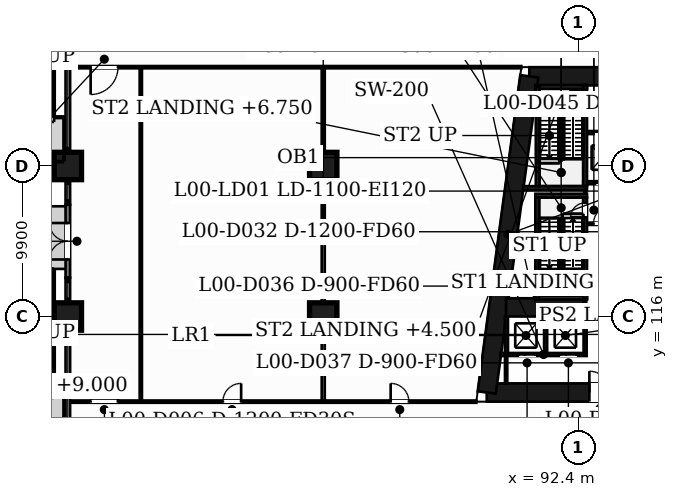
"""IFC4 building model, lengths in metres.
Left out: names, types, materials, properties, quantities, classifications, styles, units other than length and angle.
Written with IfcOpenShell. Run it as: python <this file> out.ifc"""

import sys

from ifc_helpers import new_model, si_unit, direction, frame, frame_2d, origin, origin_2d, place, context, subcontext, project, spatial, rectangle, extrude, element, fill, save


model = new_model("IFC4")
c1 = context("Model", 3, precision=1e-05, world=origin(), true_north=direction((0.0, 1.0)))
c2 = subcontext(c1, "Body", "Model", "MODEL_VIEW")
j1 = project(units=[si_unit("LENGTHUNIT", "METRE"), si_unit("PLANEANGLEUNIT", "RADIAN")], contexts=[c1])
p1 = place(None, origin())
s1 = spatial("IfcSite", under=j1, at=p1, CompositionType="ELEMENT")
p2 = place(p1, origin())
s2 = spatial("IfcBuilding", under=s1, at=p2, CompositionType="ELEMENT")
p3 = place(p2, origin())
s3 = spatial("IfcBuildingStorey", under=s2, at=p3, CompositionType="ELEMENT", Elevation=0.0)
p4 = place(p3, frame((89.156, 131.8, -0.35), z_axis=(0.0, 0.0, 1.0), x_axis=(1.0, 0.0, 0.0)))
e1 = element("IfcWall", 1, at=p4, inside=s3, PredefinedType="SHEAR", context=c2, shape_type="SweptSolid", body=[
    extrude(rectangle(XDim=11.044, YDim=1.2, at=frame_2d((5.522, 0.0))), origin(), (0.0, 0.0, 1.0), 9.35),
])
p5 = place(p4, frame((6.458, 0.0, 0.35)))
e2 = element("IfcOpeningElement", 2, at=p5, cuts=e1, PredefinedType="OPENING", context=c2, shape_type="SweptSolid", body=[
    extrude(rectangle(XDim=1.2, YDim=2.1, at=frame_2d((0.6, 1.05))), frame((0.0, 0.61, 0.0), z_axis=(0.0, -1.0, 0.0), x_axis=(1.0, 0.0, 0.0)), (0.0, 0.0, 1.0), 1.22),
])
p6 = place(p3, frame((100.2, 111.0, -0.35), z_axis=(0.0, 0.0, 1.0), x_axis=(-1.0, 0.0, 0.0)))
e3 = element("IfcWall", 3, at=p6, inside=s3, PredefinedType="SHEAR", context=c2, shape_type="SweptSolid", body=[
    extrude(rectangle(XDim=13.844, YDim=1.2, at=frame_2d((6.922, 0.0))), origin(), (0.0, 0.0, 1.0), 9.35),
])
p7 = place(p6, frame((5.694, 0.0, 0.35)))
e4 = element("IfcOpeningElement", 4, at=p7, cuts=e3, PredefinedType="OPENING", context=c2, shape_type="SweptSolid", body=[
    extrude(rectangle(XDim=1.4, YDim=2.1, at=frame_2d((0.7, 1.05))), frame((0.0, 0.61, 0.0), z_axis=(0.0, -1.0, 0.0), x_axis=(1.0, 0.0, 0.0)), (0.0, 0.0, 1.0), 1.22),
])
p8 = place(p3, frame((86.355, 111.0, -0.35), z_axis=(0.0, 0.0, 1.0), x_axis=(0.133413989637, 0.99106039542, 0.0)))
e5 = element("IfcWall", 5, at=p8, inside=s3, PredefinedType="SHEAR", context=c2, shape_type="SweptSolid", body=[
    extrude(rectangle(XDim=20.988, YDim=1.2, at=frame_2d((10.494, 0.0))), origin(), (0.0, 0.0, 1.0), 9.35),
])
p9 = place(p3, frame((87.623, 116.6, -0.35), z_axis=(0.0, 0.0, 1.0), x_axis=(1.0, 0.0, 0.0)))
e6 = element("IfcWall", 6, at=p9, inside=s3, PredefinedType="SHEAR", context=c2, shape_type="SweptSolid", body=[
    extrude(rectangle(XDim=5.077, YDim=1.2, at=frame_2d((2.539, 0.0))), origin(), (0.0, 0.0, 1.0), 9.35),
])
for number, where, z_axis, x_axis in (
    (7, (58.8, 116.0, -0.35), (0.0, 0.0, 1.0), (1.0, 0.0, 0.0)),
    (8, (75.6, 116.0, -0.35), (0.0, 0.0, 1.0), (1.0, 0.0, 0.0)),
    (9, (58.8, 125.9, -0.35), (0.0, 0.0, 1.0), (1.0, 0.0, 0.0)),
    (10, (75.6, 125.9, -0.35), (0.0, 0.0, 1.0), (1.0, 0.0, 0.0)),
):
    element("IfcColumn", number, at=place(p3, frame(where, z_axis=z_axis, x_axis=x_axis)), inside=s3, PredefinedType="COLUMN", context=c2, shape_type="SweptSolid", body=[
        extrude(rectangle(XDim=1.8, YDim=1.8, at=origin_2d()), origin(), (0.0, 0.0, 1.0), 9.35),
    ])
p10 = place(p3, frame((58.8, 118.55, 0.0), z_axis=(0.0, 0.0, 1.0), x_axis=(0.0, 1.0, 0.0)))
e11 = element("IfcWall", 11, at=p10, inside=s3, PredefinedType="SOLIDWALL", context=c2, shape_type="SweptSolid", body=[
    extrude(rectangle(XDim=4.8, YDim=0.3, at=frame_2d((2.4, 0.0))), origin(), (0.0, 0.0, 1.0), 8.1),
])
p11 = place(p10, frame((1.2, 0.0, 0.0)))
e12 = element("IfcOpeningElement", 12, at=p11, cuts=e11, PredefinedType="OPENING", context=c2, shape_type="SweptSolid", body=[
    extrude(rectangle(XDim=2.4, YDim=2.4, at=frame_2d((1.2, 1.2))), frame((0.0, 0.16, 0.0), z_axis=(0.0, -1.0, 0.0), x_axis=(1.0, 0.0, 0.0)), (0.0, 0.0, 1.0), 0.32),
])
p12 = place(p3, frame((58.85, 110.4, 0.0), z_axis=(0.0, 0.0, 1.0), x_axis=(1.0, 0.0, 0.0)))
e13 = element("IfcWall", 13, at=p12, inside=s3, PredefinedType="PARTITIONING", context=c2, shape_type="SweptSolid", body=[
    extrude(rectangle(XDim=26.819, YDim=0.15, at=frame_2d((13.409, 0.0))), origin(), (0.0, 0.0, 1.0), 8.5),
])
p13 = place(p12, frame((10.15, 0.0, 0.0)))
e14 = element("IfcOpeningElement", 14, at=p13, cuts=e13, PredefinedType="OPENING", context=c2, shape_type="SweptSolid", body=[
    extrude(rectangle(XDim=1.2, YDim=2.1, at=frame_2d((0.6, 1.05))), frame((0.0, 0.085, 0.0), z_axis=(0.0, -1.0, 0.0), x_axis=(1.0, 0.0, 0.0)), (0.0, 0.0, 1.0), 0.17),
])
p14 = place(p12, frame((21.185, 0.0, 0.0)))
e15 = element("IfcOpeningElement", 15, at=p14, cuts=e13, PredefinedType="OPENING", context=c2, shape_type="SweptSolid", body=[
    extrude(rectangle(XDim=1.2, YDim=2.1, at=frame_2d((0.6, 1.05))), frame((0.0, 0.085, 0.0), z_axis=(0.0, -1.0, 0.0), x_axis=(1.0, 0.0, 0.0)), (0.0, 0.0, 1.0), 0.17),
])
p15 = place(p12, frame((1.45, 0.0, 0.0)))
e16 = element("IfcOpeningElement", 16, at=p15, cuts=e13, PredefinedType="OPENING", context=c2, shape_type="SweptSolid", body=[
    extrude(rectangle(XDim=1.8, YDim=2.1, at=frame_2d((0.9, 1.05))), frame((0.0, 0.085, 0.0), z_axis=(0.0, -1.0, 0.0), x_axis=(1.0, 0.0, 0.0)), (0.0, 0.0, 1.0), 0.17),
])
p16 = place(p3, frame((87.267, 113.5, 0.0), z_axis=(0.0, 0.0, 1.0), x_axis=(1.0, 0.0, 0.0)))
e17 = element("IfcWall", 17, at=p16, inside=s3, PredefinedType="PARTITIONING", context=c2, shape_type="SweptSolid", body=[
    extrude(rectangle(XDim=5.66, YDim=0.2, at=frame_2d((2.83, 0.0))), origin(), (0.0, 0.0, 1.0), 8.5),
])
p17 = place(p16, frame((1.193, 0.0, 0.0)))
e18 = element("IfcOpeningElement", 18, at=p17, cuts=e17, PredefinedType="OPENING", context=c2, shape_type="SweptSolid", body=[
    extrude(rectangle(XDim=1.1, YDim=2.1, at=frame_2d((0.55, 1.05))), frame((0.0, 0.11, 0.0), z_axis=(0.0, -1.0, 0.0), x_axis=(1.0, 0.0, 0.0)), (0.0, 0.0, 1.0), 0.22),
])
p18 = place(p16, frame((3.91, 0.0, 0.0)))
e19 = element("IfcOpeningElement", 19, at=p18, cuts=e17, PredefinedType="OPENING", context=c2, shape_type="SweptSolid", body=[
    extrude(rectangle(XDim=1.1, YDim=2.1, at=frame_2d((0.55, 1.05))), frame((0.0, 0.11, 0.0), z_axis=(0.0, -1.0, 0.0), x_axis=(1.0, 0.0, 0.0)), (0.0, 0.0, 1.0), 0.22),
])
p19 = place(p3, frame((89.552, 117.245, 0.0), z_axis=(0.0, 0.0, 1.0), x_axis=(1.0, 0.0, 0.0)))
e20 = element("IfcWall", 20, at=p19, inside=s3, PredefinedType="PARTITIONING", context=c2, shape_type="SweptSolid", body=[
    extrude(rectangle(XDim=3.4, YDim=0.25, at=frame_2d((1.7, 0.0))), origin(), (0.0, 0.0, 1.0), 8.5),
])
p20 = place(p3, frame((92.827, 122.1, 0.0), z_axis=(0.0, 0.0, 1.0), x_axis=(1.0, 0.0, 0.0)))
e21 = element("IfcWall", 21, at=p20, inside=s3, PredefinedType="PARTITIONING", context=c2, shape_type="SweptSolid", body=[
    extrude(rectangle(XDim=2.4, YDim=0.15, at=frame_2d((1.2, 0.0))), origin(), (0.0, 0.0, 1.0), 8.5),
])
p21 = place(p20, frame((0.55, 0.0, 0.0)))
e22 = element("IfcOpeningElement", 22, at=p21, cuts=e21, PredefinedType="OPENING", context=c2, shape_type="SweptSolid", body=[
    extrude(rectangle(XDim=1.2, YDim=2.1, at=frame_2d((0.6, 1.05))), frame((0.0, 0.085, 0.0), z_axis=(0.0, -1.0, 0.0), x_axis=(1.0, 0.0, 0.0)), (0.0, 0.0, 1.0), 0.17),
])
p22 = place(p3, frame((89.552, 123.95, 0.0), z_axis=(0.0, 0.0, 1.0), x_axis=(1.0, 0.0, 0.0)))
e23 = element("IfcWall", 23, at=p22, inside=s3, PredefinedType="PARTITIONING", context=c2, shape_type="SweptSolid", body=[
    extrude(rectangle(XDim=3.4, YDim=0.25, at=frame_2d((1.7, 0.0))), origin(), (0.0, 0.0, 1.0), 8.5),
])
p23 = place(p3, frame((88.741, 124.45, 0.0), z_axis=(0.0, 0.0, 1.0), x_axis=(1.0, 0.0, 0.0)))
e24 = element("IfcWall", 24, at=p23, inside=s3, PredefinedType="PARTITIONING", context=c2, shape_type="SweptSolid", body=[
    extrude(rectangle(XDim=4.21, YDim=0.25, at=frame_2d((2.105, 0.0))), origin(), (0.0, 0.0, 1.0), 8.5),
])
p24 = place(p3, frame((92.702, 124.8, 0.0), z_axis=(0.0, 0.0, 1.0), x_axis=(1.0, 0.0, 0.0)))
e25 = element("IfcWall", 25, at=p24, inside=s3, PredefinedType="PARTITIONING", context=c2, shape_type="SweptSolid", body=[
    extrude(rectangle(XDim=6.898, YDim=0.2, at=frame_2d((3.449, 0.0))), origin(), (0.0, 0.0, 1.0), 8.5),
])
p25 = place(p24, frame((0.818, 0.0, 0.0)))
e26 = element("IfcOpeningElement", 26, at=p25, cuts=e25, PredefinedType="OPENING", context=c2, shape_type="SweptSolid", body=[
    extrude(rectangle(XDim=1.1, YDim=2.1, at=frame_2d((0.55, 1.05))), frame((0.0, 0.11, 0.0), z_axis=(0.0, -1.0, 0.0), x_axis=(1.0, 0.0, 0.0)), (0.0, 0.0, 1.0), 0.22),
])
p26 = place(p24, frame((5.105, 0.0, 0.0)))
e27 = element("IfcOpeningElement", 27, at=p26, cuts=e25, PredefinedType="OPENING", context=c2, shape_type="SweptSolid", body=[
    extrude(rectangle(XDim=1.1, YDim=2.1, at=frame_2d((0.55, 1.05))), frame((0.0, 0.11, 0.0), z_axis=(0.0, -1.0, 0.0), x_axis=(1.0, 0.0, 0.0)), (0.0, 0.0, 1.0), 0.22),
])
p27 = place(p3, frame((92.827, 128.1, 0.0), z_axis=(0.0, 0.0, 1.0), x_axis=(1.0, 0.0, 0.0)))
e28 = element("IfcWall", 28, at=p27, inside=s3, PredefinedType="PARTITIONING", context=c2, shape_type="SweptSolid", body=[
    extrude(rectangle(XDim=6.773, YDim=0.2, at=frame_2d((3.387, 0.0))), origin(), (0.0, 0.0, 1.0), 8.5),
])
p28 = place(p27, frame((2.951, 0.0, 0.0)))
e29 = element("IfcOpeningElement", 29, at=p28, cuts=e28, PredefinedType="OPENING", context=c2, shape_type="SweptSolid", body=[
    extrude(rectangle(XDim=1.1, YDim=2.1, at=frame_2d((0.55, 1.05))), frame((0.0, 0.11, 0.0), z_axis=(0.0, -1.0, 0.0), x_axis=(1.0, 0.0, 0.0)), (0.0, 0.0, 1.0), 0.22),
])
p29 = place(p3, frame((89.552, 131.101, 0.0), z_axis=(0.0, 0.0, 1.0), x_axis=(1.0, 0.0, 0.0)))
e30 = element("IfcWall", 30, at=p29, inside=s3, PredefinedType="PARTITIONING", context=c2, shape_type="SweptSolid", body=[
    extrude(rectangle(XDim=3.4, YDim=0.25, at=frame_2d((1.7, 0.0))), origin(), (0.0, 0.0, 1.0), 8.5),
])
p30 = place(p3, frame((58.85, 132.4, 0.0), z_axis=(0.0, 0.0, 1.0), x_axis=(1.0, 0.0, 0.0)))
e31 = element("IfcWall", 31, at=p30, inside=s3, PredefinedType="PARTITIONING", context=c2, shape_type="SweptSolid", body=[
    extrude(rectangle(XDim=29.781, YDim=0.15, at=frame_2d((14.891, 0.0))), origin(), (0.0, 0.0, 1.0), 8.5),
])
p31 = place(p30, frame((1.45, 0.0, 0.0)))
e32 = element("IfcOpeningElement", 32, at=p31, cuts=e31, PredefinedType="OPENING", context=c2, shape_type="SweptSolid", body=[
    extrude(rectangle(XDim=1.8, YDim=2.1, at=frame_2d((0.9, 1.05))), frame((0.0, 0.085, 0.0), z_axis=(0.0, -1.0, 0.0), x_axis=(1.0, 0.0, 0.0)), (0.0, 0.0, 1.0), 0.17),
])
p32 = place(p3, frame((63.6, 110.475, 0.0), z_axis=(0.0, 0.0, 1.0), x_axis=(0.0, 1.0, 0.0)))
e33 = element("IfcWall", 33, at=p32, inside=s3, PredefinedType="PARTITIONING", context=c2, shape_type="SweptSolid", body=[
    extrude(rectangle(XDim=21.85, YDim=0.15, at=frame_2d((10.925, 0.0))), origin(), (0.0, 0.0, 1.0), 8.5),
])
p33 = place(p3, frame((75.6, 110.475, 0.0), z_axis=(0.0, 0.0, 1.0), x_axis=(0.0, 1.0, 0.0)))
e34 = element("IfcWall", 34, at=p33, inside=s3, PredefinedType="PARTITIONING", context=c2, shape_type="SweptSolid", body=[
    extrude(rectangle(XDim=21.85, YDim=0.2, at=frame_2d((10.925, 0.0))), origin(), (0.0, 0.0, 1.0), 8.5),
])
p34 = place(p3, frame((87.653, 113.6, 0.0), z_axis=(0.0, 0.0, 1.0), x_axis=(0.0, 1.0, 0.0)))
e35 = element("IfcWall", 35, at=p34, inside=s3, PredefinedType="PARTITIONING", context=c2, shape_type="SweptSolid", body=[
    extrude(rectangle(XDim=2.4, YDim=0.2, at=frame_2d((1.2, 0.0))), origin(), (0.0, 0.0, 1.0), 8.5),
])
p35 = place(p3, frame((87.631, 111.6, 0.0), z_axis=(0.0, 0.0, 1.0), x_axis=(0.0, 1.0, 0.0)))
e36 = element("IfcWall", 36, at=p35, inside=s3, PredefinedType="PARTITIONING", context=c2, shape_type="SweptSolid", body=[
    extrude(rectangle(XDim=1.8, YDim=0.15, at=frame_2d((0.9, 0.0))), origin(), (0.0, 0.0, 1.0), 8.5),
])
p36 = place(p3, frame((89.677, 117.17, 0.0), z_axis=(0.0, 0.0, 1.0), x_axis=(0.0, 1.0, 0.0)))
e37 = element("IfcWall", 37, at=p36, inside=s3, PredefinedType="PARTITIONING", context=c2, shape_type="SweptSolid", body=[
    extrude(rectangle(XDim=6.655, YDim=0.25, at=frame_2d((3.328, 0.0))), origin(), (0.0, 0.0, 1.0), 8.5),
])
p37 = place(p3, frame((89.707, 124.575, 0.0), z_axis=(0.0, 0.0, 1.0), x_axis=(0.0, 1.0, 0.0)))
e38 = element("IfcWall", 38, at=p37, inside=s3, PredefinedType="PARTITIONING", context=c2, shape_type="SweptSolid", body=[
    extrude(rectangle(XDim=6.5, YDim=0.25, at=frame_2d((3.25, 0.0))), origin(), (0.0, 0.0, 1.0), 8.5),
])
for number, where, z_axis, x_axis in (
    (39, (90.229, 113.6, 0.0), (0.0, 0.0, 1.0), (0.0, 1.0, 0.0)),
    (40, (92.827, 113.6, 0.0), (0.0, 0.0, 1.0), (0.0, 1.0, 0.0)),
):
    element("IfcWall", number, at=place(p3, frame(where, z_axis=z_axis, x_axis=x_axis)), inside=s3, PredefinedType="PARTITIONING", context=c2, shape_type="SweptSolid", body=[
        extrude(rectangle(XDim=2.4, YDim=0.2, at=frame_2d((1.2, 0.0))), origin(), (0.0, 0.0, 1.0), 8.5),
    ])
p38 = place(p3, frame((92.827, 116.0, 0.0), z_axis=(0.0, 0.0, 1.0), x_axis=(0.0, 1.0, 0.0)))
e41 = element("IfcWall", 41, at=p38, inside=s3, PredefinedType="PARTITIONING", context=c2, shape_type="SweptSolid", body=[
    extrude(rectangle(XDim=1.075, YDim=0.15, at=frame_2d((0.538, 0.0))), origin(), (0.0, 0.0, 1.0), 8.5),
])
p39 = place(p3, frame((92.827, 124.075, 0.0), z_axis=(0.0, 0.0, 1.0), x_axis=(0.0, 1.0, 0.0)))
e42 = element("IfcWall", 42, at=p39, inside=s3, PredefinedType="PARTITIONING", context=c2, shape_type="SweptSolid", body=[
    extrude(rectangle(XDim=0.25, YDim=0.15, at=frame_2d((0.125, 0.0))), origin(), (0.0, 0.0, 1.0), 8.5),
])
p40 = place(p3, frame((92.827, 117.17, 0.0), z_axis=(0.0, 0.0, 1.0), x_axis=(0.0, 1.0, 0.0)))
e43 = element("IfcWall", 43, at=p40, inside=s3, PredefinedType="PARTITIONING", context=c2, shape_type="SweptSolid", body=[
    extrude(rectangle(XDim=6.655, YDim=0.25, at=frame_2d((3.328, 0.0))), origin(), (0.0, 0.0, 1.0), 8.5),
])
p41 = place(p40, frame((5.355, 0.0, 0.0)))
e44 = element("IfcOpeningElement", 44, at=p41, cuts=e43, PredefinedType="OPENING", context=c2, shape_type="SweptSolid", body=[
    extrude(rectangle(XDim=0.95, YDim=2.1, at=frame_2d((0.475, 1.05))), frame((0.0, 0.135, 0.0), z_axis=(0.0, -1.0, 0.0), x_axis=(1.0, 0.0, 0.0)), (0.0, 0.0, 1.0), 0.27),
])
p42 = place(p3, frame((92.827, 124.575, 0.0), z_axis=(0.0, 0.0, 1.0), x_axis=(0.0, 1.0, 0.0)))
e45 = element("IfcWall", 45, at=p42, inside=s3, PredefinedType="PARTITIONING", context=c2, shape_type="SweptSolid", body=[
    extrude(rectangle(XDim=6.655, YDim=0.25, at=frame_2d((3.328, 0.0))), origin(), (0.0, 0.0, 1.0), 8.5),
])
p43 = place(p42, frame((5.325, 0.0, 0.0)))
e46 = element("IfcOpeningElement", 46, at=p43, cuts=e45, PredefinedType="OPENING", context=c2, shape_type="SweptSolid", body=[
    extrude(rectangle(XDim=1.0, YDim=2.1, at=frame_2d((0.5, 1.05))), frame((0.0, 0.135, 0.0), z_axis=(0.0, -1.0, 0.0), x_axis=(1.0, 0.0, 0.0)), (0.0, 0.0, 1.0), 0.27),
])
p44 = place(p11, origin())
e47 = element("IfcDoor", 47, at=p44, inside=s3, OperationType="DOUBLE_DOOR_DOUBLE_SWING", PredefinedType="DOOR", context=c2, shape_type="SweptSolid", body=[
    extrude(rectangle(XDim=2.4, YDim=2.4, at=frame_2d((1.2, 1.2))), frame((0.0, 0.025, 0.0), z_axis=(0.0, -1.0, 0.0), x_axis=(1.0, 0.0, 0.0)), (0.0, 0.0, 1.0), 0.05),
])
fill(e12, e47)
p45 = place(p13, origin())
e48 = element("IfcDoor", 48, at=p45, inside=s3, OperationType="SINGLE_SWING_RIGHT", PredefinedType="DOOR", context=c2, shape_type="SweptSolid", body=[
    extrude(rectangle(XDim=1.2, YDim=2.1, at=frame_2d((0.6, 1.05))), frame((0.0, 0.025, 0.0), z_axis=(0.0, -1.0, 0.0), x_axis=(1.0, 0.0, 0.0)), (0.0, 0.0, 1.0), 0.05),
])
fill(e14, e48)
p46 = place(p14, origin())
e49 = element("IfcDoor", 49, at=p46, inside=s3, OperationType="SINGLE_SWING_LEFT", PredefinedType="DOOR", context=c2, shape_type="SweptSolid", body=[
    extrude(rectangle(XDim=1.2, YDim=2.1, at=frame_2d((0.6, 1.05))), frame((0.0, 0.025, 0.0), z_axis=(0.0, -1.0, 0.0), x_axis=(1.0, 0.0, 0.0)), (0.0, 0.0, 1.0), 0.05),
])
fill(e15, e49)
p47 = place(p15, origin())
e50 = element("IfcDoor", 50, at=p47, inside=s3, OperationType="SINGLE_SWING_RIGHT", PredefinedType="DOOR", context=c2, shape_type="SweptSolid", body=[
    extrude(rectangle(XDim=1.8, YDim=2.1, at=frame_2d((0.9, 1.05))), frame((0.0, 0.025, 0.0), z_axis=(0.0, -1.0, 0.0), x_axis=(1.0, 0.0, 0.0)), (0.0, 0.0, 1.0), 0.05),
])
fill(e16, e50)
p48 = place(p31, origin())
e51 = element("IfcDoor", 51, at=p48, inside=s3, OperationType="SINGLE_SWING_LEFT", PredefinedType="DOOR", context=c2, shape_type="SweptSolid", body=[
    extrude(rectangle(XDim=1.8, YDim=2.1, at=frame_2d((0.9, 1.05))), frame((0.0, 0.025, 0.0), z_axis=(0.0, -1.0, 0.0), x_axis=(1.0, 0.0, 0.0)), (0.0, 0.0, 1.0), 0.05),
])
fill(e32, e51)
p49 = place(p21, origin())
e52 = element("IfcDoor", 52, at=p49, inside=s3, OperationType="SINGLE_SWING_RIGHT", PredefinedType="DOOR", context=c2, shape_type="SweptSolid", body=[
    extrude(rectangle(XDim=1.2, YDim=2.1, at=frame_2d((0.6, 1.05))), frame((0.0, 0.025, 0.0), z_axis=(0.0, -1.0, 0.0), x_axis=(1.0, 0.0, 0.0)), (0.0, 0.0, 1.0), 0.05),
])
fill(e22, e52)
p50 = place(p25, origin())
e53 = element("IfcDoor", 53, at=p50, inside=s3, OperationType="SLIDING_TO_LEFT", PredefinedType="DOOR", context=c2, shape_type="SweptSolid", body=[
    extrude(rectangle(XDim=1.1, YDim=2.1, at=frame_2d((0.55, 1.05))), frame((0.0, 0.025, 0.0), z_axis=(0.0, -1.0, 0.0), x_axis=(1.0, 0.0, 0.0)), (0.0, 0.0, 1.0), 0.05),
])
fill(e26, e53)
p51 = place(p41, origin())
e54 = element("IfcDoor", 54, at=p51, inside=s3, OperationType="SINGLE_SWING_LEFT", PredefinedType="DOOR", context=c2, shape_type="SweptSolid", body=[
    extrude(rectangle(XDim=0.95, YDim=2.1, at=frame_2d((0.475, 1.05))), frame((0.0, 0.025, 0.0), z_axis=(0.0, -1.0, 0.0), x_axis=(1.0, 0.0, 0.0)), (0.0, 0.0, 1.0), 0.05),
])
fill(e44, e54)
p52 = place(p43, origin())
e55 = element("IfcDoor", 55, at=p52, inside=s3, OperationType="SINGLE_SWING_RIGHT", PredefinedType="DOOR", context=c2, shape_type="SweptSolid", body=[
    extrude(rectangle(XDim=1.0, YDim=2.1, at=frame_2d((0.5, 1.05))), frame((0.0, 0.025, 0.0), z_axis=(0.0, -1.0, 0.0), x_axis=(1.0, 0.0, 0.0)), (0.0, 0.0, 1.0), 0.05),
])
fill(e46, e55)
p53 = place(p17, origin())
e56 = element("IfcDoor", 56, at=p53, inside=s3, OperationType="SLIDING_TO_LEFT", PredefinedType="DOOR", context=c2, shape_type="SweptSolid", body=[
    extrude(rectangle(XDim=1.1, YDim=2.1, at=frame_2d((0.55, 1.05))), frame((0.0, 0.025, 0.0), z_axis=(0.0, -1.0, 0.0), x_axis=(1.0, 0.0, 0.0)), (0.0, 0.0, 1.0), 0.05),
])
fill(e18, e56)
p54 = place(p18, origin())
e57 = element("IfcDoor", 57, at=p54, inside=s3, OperationType="SLIDING_TO_LEFT", PredefinedType="DOOR", context=c2, shape_type="SweptSolid", body=[
    extrude(rectangle(XDim=1.1, YDim=2.1, at=frame_2d((0.55, 1.05))), frame((0.0, 0.025, 0.0), z_axis=(0.0, -1.0, 0.0), x_axis=(1.0, 0.0, 0.0)), (0.0, 0.0, 1.0), 0.05),
])
fill(e19, e57)
p55 = place(p7, origin())
e58 = element("IfcDoor", 58, at=p55, inside=s3, OperationType="SINGLE_SWING_RIGHT", PredefinedType="DOOR", context=c2, shape_type="SweptSolid", body=[
    extrude(rectangle(XDim=1.4, YDim=2.1, at=frame_2d((0.7, 1.05))), frame((0.0, 0.025, 0.0), z_axis=(0.0, -1.0, 0.0), x_axis=(1.0, 0.0, 0.0)), (0.0, 0.0, 1.0), 0.05),
])
fill(e4, e58)
save(model, sys.argv[1])
